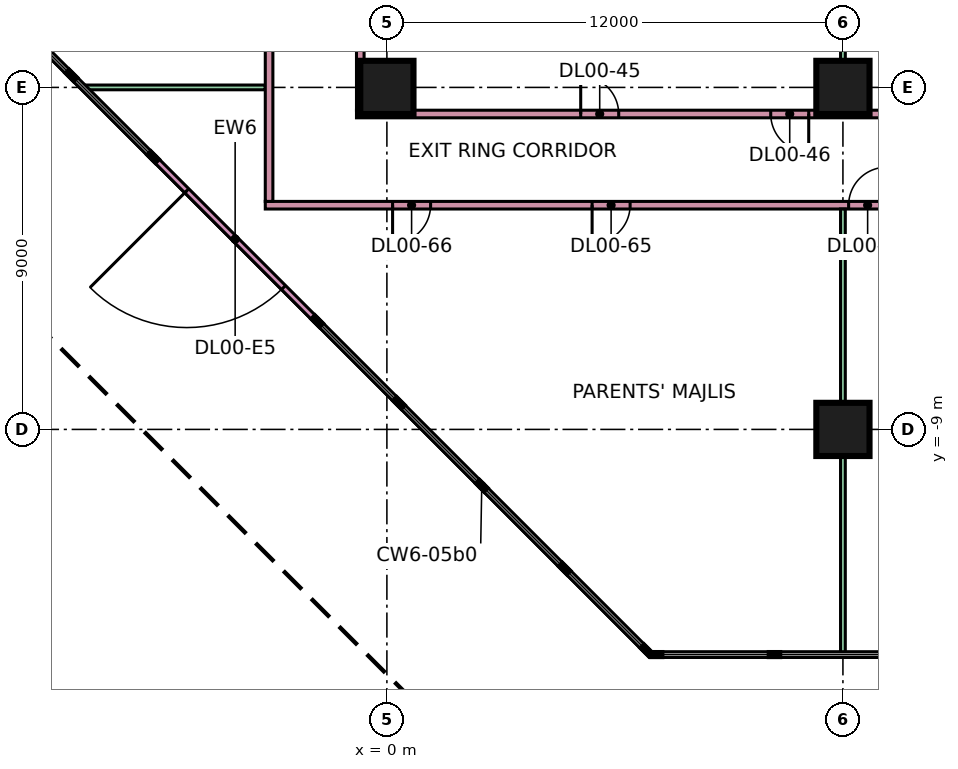
"""IFC4 building model, lengths in metres.
Left out: names, types, materials, properties, quantities, classifications, styles, units other than length and angle.
Written with IfcOpenShell. Run it as: python <this file> out.ifc"""

import sys

from ifc_helpers import new_model, si_unit, direction, frame, frame_2d, origin, origin_2d, place, context, subcontext, project, spatial, rectangle, extrude, element, fill, save


model = new_model("IFC4")
c1 = context("Model", 3, precision=1e-05, world=origin(), true_north=direction((0.0, 1.0)))
c2 = subcontext(c1, "Body", "Model", "MODEL_VIEW")
j1 = project(units=[si_unit("LENGTHUNIT", "METRE"), si_unit("PLANEANGLEUNIT", "RADIAN")], contexts=[c1])
p1 = place(None, origin())
s1 = spatial("IfcSite", under=j1, at=p1, CompositionType="ELEMENT")
p2 = place(p1, origin())
s2 = spatial("IfcBuilding", under=s1, at=p2, CompositionType="ELEMENT")
p3 = place(p2, origin())
s3 = spatial("IfcBuildingStorey", under=s2, at=p3, CompositionType="ELEMENT", Elevation=0.0)
for number, where, z_axis, x_axis in (
    (1, (12.0, -9.0, 0.0), (0.0, 0.0, 1.0), (1.0, 0.0, 0.0)),
    (2, (0.0, 0.0, 0.0), (0.0, 0.0, 1.0), (1.0, 0.0, 0.0)),
    (3, (12.0, 0.0, 0.0), (0.0, 0.0, 1.0), (1.0, 0.0, 0.0)),
):
    element("IfcColumn", number, at=place(p3, frame(where, z_axis=z_axis, x_axis=x_axis)), inside=s3, PredefinedType="COLUMN", context=c2, shape_type="SweptSolid", body=[
        extrude(rectangle(XDim=1.4, YDim=1.4, at=origin_2d()), origin(), (0.0, 0.0, 1.0), 7.2),
    ])
p4 = place(p3, frame((-6.114, -1.872, 0.0), z_axis=(0.0, 0.0, 1.0), x_axis=(0.707106781187, -0.707106781187, 0.0)))
e4 = element("IfcWall", 4, at=p4, inside=s3, PredefinedType="SOLIDWALL", context=c2, shape_type="SweptSolid", body=[
    extrude(rectangle(XDim=6.0, YDim=0.15, at=frame_2d((3.0, 0.0))), origin(), (0.0, 0.0, 1.0), 6.8),
])
p5 = place(p4, frame((1.2, 0.0, 0.0)))
e5 = element("IfcOpeningElement", 5, at=p5, cuts=e4, PredefinedType="OPENING", context=c2, shape_type="SweptSolid", body=[
    extrude(rectangle(XDim=3.6, YDim=2.8, at=frame_2d((1.8, 1.4))), frame((0.0, 0.085, 0.0), z_axis=(0.0, -1.0, 0.0), x_axis=(1.0, 0.0, 0.0)), (0.0, 0.0, 1.0), 0.17),
])
p6 = place(p3, frame((-7.986, 0.0, 0.0), z_axis=(0.0, 0.0, 1.0), x_axis=(1.0, 0.0, 0.0)))
e6 = element("IfcWall", 6, at=p6, inside=s3, PredefinedType="PARTITIONING", context=c2, shape_type="SweptSolid", body=[
    extrude(rectangle(XDim=4.786, YDim=0.125, at=frame_2d((2.393, 0.0))), origin(), (0.0, 0.0, 1.0), 6.8),
])
p7 = place(p3, frame((-3.2, -3.1, 0.0), z_axis=(0.0, 0.0, 1.0), x_axis=(1.0, 0.0, 0.0)))
e7 = element("IfcWall", 7, at=p7, inside=s3, PredefinedType="PARTITIONING", context=c2, shape_type="SweptSolid", body=[
    extrude(rectangle(XDim=78.3, YDim=0.2, at=frame_2d((39.15, 0.0))), origin(), (0.0, 0.0, 1.0), 6.8),
])
p8 = place(p7, frame((70.1, 0.0, 0.0)))
e8 = element("IfcOpeningElement", 8, at=p8, cuts=e7, PredefinedType="OPENING", context=c2, shape_type="SweptSolid", body=[
    extrude(rectangle(XDim=1.0, YDim=2.1, at=frame_2d((0.5, 1.05))), frame((0.0, 0.11, 0.0), z_axis=(0.0, -1.0, 0.0), x_axis=(1.0, 0.0, 0.0)), (0.0, 0.0, 1.0), 0.22),
])
p9 = place(p7, frame((66.35, 0.0, 0.0)))
e9 = element("IfcOpeningElement", 9, at=p9, cuts=e7, PredefinedType="OPENING", context=c2, shape_type="SweptSolid", body=[
    extrude(rectangle(XDim=1.0, YDim=2.1, at=frame_2d((0.5, 1.05))), frame((0.0, 0.11, 0.0), z_axis=(0.0, -1.0, 0.0), x_axis=(1.0, 0.0, 0.0)), (0.0, 0.0, 1.0), 0.22),
])
p10 = place(p7, frame((76.35, 0.0, 0.0)))
e10 = element("IfcOpeningElement", 10, at=p10, cuts=e7, PredefinedType="OPENING", context=c2, shape_type="SweptSolid", body=[
    extrude(rectangle(XDim=1.0, YDim=2.1, at=frame_2d((0.5, 1.05))), frame((0.0, 0.11, 0.0), z_axis=(0.0, -1.0, 0.0), x_axis=(1.0, 0.0, 0.0)), (0.0, 0.0, 1.0), 0.22),
])
p11 = place(p7, frame((8.6, 0.0, 0.0)))
e11 = element("IfcOpeningElement", 11, at=p11, cuts=e7, PredefinedType="OPENING", context=c2, shape_type="SweptSolid", body=[
    extrude(rectangle(XDim=1.0, YDim=2.1, at=frame_2d((0.5, 1.05))), frame((0.0, 0.11, 0.0), z_axis=(0.0, -1.0, 0.0), x_axis=(1.0, 0.0, 0.0)), (0.0, 0.0, 1.0), 0.22),
])
p12 = place(p7, frame((3.35, 0.0, 0.0)))
e12 = element("IfcOpeningElement", 12, at=p12, cuts=e7, PredefinedType="OPENING", context=c2, shape_type="SweptSolid", body=[
    extrude(rectangle(XDim=1.0, YDim=2.1, at=frame_2d((0.5, 1.05))), frame((0.0, 0.11, 0.0), z_axis=(0.0, -1.0, 0.0), x_axis=(1.0, 0.0, 0.0)), (0.0, 0.0, 1.0), 0.22),
])
p13 = place(p7, frame((20.6, 0.0, 0.0)))
e13 = element("IfcOpeningElement", 13, at=p13, cuts=e7, PredefinedType="OPENING", context=c2, shape_type="SweptSolid", body=[
    extrude(rectangle(XDim=1.0, YDim=2.1, at=frame_2d((0.5, 1.05))), frame((0.0, 0.11, 0.0), z_axis=(0.0, -1.0, 0.0), x_axis=(1.0, 0.0, 0.0)), (0.0, 0.0, 1.0), 0.22),
])
p14 = place(p7, frame((15.35, 0.0, 0.0)))
e14 = element("IfcOpeningElement", 14, at=p14, cuts=e7, PredefinedType="OPENING", context=c2, shape_type="SweptSolid", body=[
    extrude(rectangle(XDim=1.0, YDim=2.1, at=frame_2d((0.5, 1.05))), frame((0.0, 0.11, 0.0), z_axis=(0.0, -1.0, 0.0), x_axis=(1.0, 0.0, 0.0)), (0.0, 0.0, 1.0), 0.22),
])
p15 = place(p7, frame((32.6, 0.0, 0.0)))
e15 = element("IfcOpeningElement", 15, at=p15, cuts=e7, PredefinedType="OPENING", context=c2, shape_type="SweptSolid", body=[
    extrude(rectangle(XDim=1.0, YDim=2.1, at=frame_2d((0.5, 1.05))), frame((0.0, 0.11, 0.0), z_axis=(0.0, -1.0, 0.0), x_axis=(1.0, 0.0, 0.0)), (0.0, 0.0, 1.0), 0.22),
])
p16 = place(p7, frame((27.35, 0.0, 0.0)))
e16 = element("IfcOpeningElement", 16, at=p16, cuts=e7, PredefinedType="OPENING", context=c2, shape_type="SweptSolid", body=[
    extrude(rectangle(XDim=1.0, YDim=2.1, at=frame_2d((0.5, 1.05))), frame((0.0, 0.11, 0.0), z_axis=(0.0, -1.0, 0.0), x_axis=(1.0, 0.0, 0.0)), (0.0, 0.0, 1.0), 0.22),
])
p17 = place(p7, frame((44.85, 0.0, 0.0)))
e17 = element("IfcOpeningElement", 17, at=p17, cuts=e7, PredefinedType="OPENING", context=c2, shape_type="SweptSolid", body=[
    extrude(rectangle(XDim=1.8, YDim=2.1, at=frame_2d((0.9, 1.05))), frame((0.0, 0.11, 0.0), z_axis=(0.0, -1.0, 0.0), x_axis=(1.0, 0.0, 0.0)), (0.0, 0.0, 1.0), 0.22),
])
p18 = place(p7, frame((50.15, 0.0, 0.0)))
e18 = element("IfcOpeningElement", 18, at=p18, cuts=e7, PredefinedType="OPENING", context=c2, shape_type="SweptSolid", body=[
    extrude(rectangle(XDim=1.8, YDim=2.1, at=frame_2d((0.9, 1.05))), frame((0.0, 0.11, 0.0), z_axis=(0.0, -1.0, 0.0), x_axis=(1.0, 0.0, 0.0)), (0.0, 0.0, 1.0), 0.22),
])
p19 = place(p7, frame((53.75, 0.0, 0.0)))
e19 = element("IfcOpeningElement", 19, at=p19, cuts=e7, PredefinedType="OPENING", context=c2, shape_type="SweptSolid", body=[
    extrude(rectangle(XDim=1.8, YDim=2.1, at=frame_2d((0.9, 1.05))), frame((0.0, 0.11, 0.0), z_axis=(0.0, -1.0, 0.0), x_axis=(1.0, 0.0, 0.0)), (0.0, 0.0, 1.0), 0.22),
])
p20 = place(p3, frame((-3.1, -3.0, 0.0), z_axis=(0.0, 0.0, 1.0), x_axis=(0.0, 1.0, 0.0)))
e20 = element("IfcWall", 20, at=p20, inside=s3, PredefinedType="PARTITIONING", context=c2, shape_type="SweptSolid", body=[
    extrude(rectangle(XDim=69.1, YDim=0.2, at=frame_2d((34.55, 0.0))), origin(), (0.0, 0.0, 1.0), 6.8),
])
p21 = place(p20, frame((8.6, 0.0, 0.0)))
e21 = element("IfcOpeningElement", 21, at=p21, cuts=e20, PredefinedType="OPENING", context=c2, shape_type="SweptSolid", body=[
    extrude(rectangle(XDim=1.0, YDim=2.1, at=frame_2d((0.5, 1.05))), frame((0.0, 0.11, 0.0), z_axis=(0.0, -1.0, 0.0), x_axis=(1.0, 0.0, 0.0)), (0.0, 0.0, 1.0), 0.22),
])
p22 = place(p20, frame((13.85, 0.0, 0.0)))
e22 = element("IfcOpeningElement", 22, at=p22, cuts=e20, PredefinedType="OPENING", context=c2, shape_type="SweptSolid", body=[
    extrude(rectangle(XDim=1.0, YDim=2.1, at=frame_2d((0.5, 1.05))), frame((0.0, 0.11, 0.0), z_axis=(0.0, -1.0, 0.0), x_axis=(1.0, 0.0, 0.0)), (0.0, 0.0, 1.0), 0.22),
])
p23 = place(p20, frame((18.6, 0.0, 0.0)))
e23 = element("IfcOpeningElement", 23, at=p23, cuts=e20, PredefinedType="OPENING", context=c2, shape_type="SweptSolid", body=[
    extrude(rectangle(XDim=1.0, YDim=2.1, at=frame_2d((0.5, 1.05))), frame((0.0, 0.11, 0.0), z_axis=(0.0, -1.0, 0.0), x_axis=(1.0, 0.0, 0.0)), (0.0, 0.0, 1.0), 0.22),
])
p24 = place(p20, frame((66.95, 0.0, 0.0)))
e24 = element("IfcOpeningElement", 24, at=p24, cuts=e20, PredefinedType="OPENING", context=c2, shape_type="SweptSolid", body=[
    extrude(rectangle(XDim=1.0, YDim=2.1, at=frame_2d((0.5, 1.05))), frame((0.0, 0.11, 0.0), z_axis=(0.0, -1.0, 0.0), x_axis=(1.0, 0.0, 0.0)), (0.0, 0.0, 1.0), 0.22),
])
p25 = place(p20, frame((59.85, 0.0, 0.0)))
e25 = element("IfcOpeningElement", 25, at=p25, cuts=e20, PredefinedType="OPENING", context=c2, shape_type="SweptSolid", body=[
    extrude(rectangle(XDim=1.8, YDim=2.1, at=frame_2d((0.9, 1.05))), frame((0.0, 0.11, 0.0), z_axis=(0.0, -1.0, 0.0), x_axis=(1.0, 0.0, 0.0)), (0.0, 0.0, 1.0), 0.22),
])
p26 = place(p20, frame((49.85, 0.0, 0.0)))
e26 = element("IfcOpeningElement", 26, at=p26, cuts=e20, PredefinedType="OPENING", context=c2, shape_type="SweptSolid", body=[
    extrude(rectangle(XDim=1.8, YDim=2.1, at=frame_2d((0.9, 1.05))), frame((0.0, 0.11, 0.0), z_axis=(0.0, -1.0, 0.0), x_axis=(1.0, 0.0, 0.0)), (0.0, 0.0, 1.0), 0.22),
])
p27 = place(p20, frame((29.85, 0.0, 0.0)))
e27 = element("IfcOpeningElement", 27, at=p27, cuts=e20, PredefinedType="OPENING", context=c2, shape_type="SweptSolid", body=[
    extrude(rectangle(XDim=1.8, YDim=2.1, at=frame_2d((0.9, 1.05))), frame((0.0, 0.11, 0.0), z_axis=(0.0, -1.0, 0.0), x_axis=(1.0, 0.0, 0.0)), (0.0, 0.0, 1.0), 0.22),
])
p28 = place(p20, frame((39.6, 0.0, 0.0)))
e28 = element("IfcOpeningElement", 28, at=p28, cuts=e20, PredefinedType="OPENING", context=c2, shape_type="SweptSolid", body=[
    extrude(rectangle(XDim=1.8, YDim=2.1, at=frame_2d((0.9, 1.05))), frame((0.0, 0.11, 0.0), z_axis=(0.0, -1.0, 0.0), x_axis=(1.0, 0.0, 0.0)), (0.0, 0.0, 1.0), 0.22),
])
p29 = place(p20, frame((23.55, 0.0, 0.0)))
e29 = element("IfcOpeningElement", 29, at=p29, cuts=e20, PredefinedType="OPENING", context=c2, shape_type="SweptSolid", body=[
    extrude(rectangle(XDim=1.8, YDim=2.1, at=frame_2d((0.9, 1.05))), frame((0.0, 0.11, 0.0), z_axis=(0.0, -1.0, 0.0), x_axis=(1.0, 0.0, 0.0)), (0.0, 0.0, 1.0), 0.22),
])
p30 = place(p3, frame((-0.8, -0.7, 0.0), z_axis=(0.0, 0.0, 1.0), x_axis=(1.0, 0.0, 0.0)))
e30 = element("IfcWall", 30, at=p30, inside=s3, PredefinedType="PARTITIONING", context=c2, shape_type="SweptSolid", body=[
    extrude(rectangle(XDim=46.5, YDim=0.2, at=frame_2d((23.25, 0.0))), origin(), (0.0, 0.0, 1.0), 6.8),
])
p31 = place(p30, frame((39.85, 0.0, 0.0)))
e31 = element("IfcOpeningElement", 31, at=p31, cuts=e30, PredefinedType="OPENING", context=c2, shape_type="SweptSolid", body=[
    extrude(rectangle(XDim=1.8, YDim=2.1, at=frame_2d((0.9, 1.05))), frame((0.0, 0.11, 0.0), z_axis=(0.0, -1.0, 0.0), x_axis=(1.0, 0.0, 0.0)), (0.0, 0.0, 1.0), 0.22),
])
p32 = place(p30, frame((5.9, 0.0, 0.0)))
e32 = element("IfcOpeningElement", 32, at=p32, cuts=e30, PredefinedType="OPENING", context=c2, shape_type="SweptSolid", body=[
    extrude(rectangle(XDim=1.0, YDim=2.1, at=frame_2d((0.5, 1.05))), frame((0.0, 0.11, 0.0), z_axis=(0.0, -1.0, 0.0), x_axis=(1.0, 0.0, 0.0)), (0.0, 0.0, 1.0), 0.22),
])
p33 = place(p30, frame((10.9, 0.0, 0.0)))
e33 = element("IfcOpeningElement", 33, at=p33, cuts=e30, PredefinedType="OPENING", context=c2, shape_type="SweptSolid", body=[
    extrude(rectangle(XDim=1.0, YDim=2.1, at=frame_2d((0.5, 1.05))), frame((0.0, 0.11, 0.0), z_axis=(0.0, -1.0, 0.0), x_axis=(1.0, 0.0, 0.0)), (0.0, 0.0, 1.0), 0.22),
])
p34 = place(p30, frame((18.4, 0.0, 0.0)))
e34 = element("IfcOpeningElement", 34, at=p34, cuts=e30, PredefinedType="OPENING", context=c2, shape_type="SweptSolid", body=[
    extrude(rectangle(XDim=1.0, YDim=2.1, at=frame_2d((0.5, 1.05))), frame((0.0, 0.11, 0.0), z_axis=(0.0, -1.0, 0.0), x_axis=(1.0, 0.0, 0.0)), (0.0, 0.0, 1.0), 0.22),
])
p35 = place(p30, frame((29.4, 0.0, 0.0)))
e35 = element("IfcOpeningElement", 35, at=p35, cuts=e30, PredefinedType="OPENING", context=c2, shape_type="SweptSolid", body=[
    extrude(rectangle(XDim=1.0, YDim=2.1, at=frame_2d((0.5, 1.05))), frame((0.0, 0.11, 0.0), z_axis=(0.0, -1.0, 0.0), x_axis=(1.0, 0.0, 0.0)), (0.0, 0.0, 1.0), 0.22),
])
p36 = place(p3, frame((-0.7, -0.6, 0.0), z_axis=(0.0, 0.0, 1.0), x_axis=(0.0, 1.0, 0.0)))
e36 = element("IfcWall", 36, at=p36, inside=s3, PredefinedType="PARTITIONING", context=c2, shape_type="SweptSolid", body=[
    extrude(rectangle(XDim=23.6, YDim=0.2, at=frame_2d((11.8, 0.0))), origin(), (0.0, 0.0, 1.0), 6.8),
])
p37 = place(p36, frame((21.25, 0.0, 0.0)))
e37 = element("IfcOpeningElement", 37, at=p37, cuts=e36, PredefinedType="OPENING", context=c2, shape_type="SweptSolid", body=[
    extrude(rectangle(XDim=1.8, YDim=2.1, at=frame_2d((0.9, 1.05))), frame((0.0, 0.11, 0.0), z_axis=(0.0, -1.0, 0.0), x_axis=(1.0, 0.0, 0.0)), (0.0, 0.0, 1.0), 0.22),
])
p38 = place(p36, frame((13.5, 0.0, 0.0)))
e38 = element("IfcOpeningElement", 38, at=p38, cuts=e36, PredefinedType="OPENING", context=c2, shape_type="SweptSolid", body=[
    extrude(rectangle(XDim=1.0, YDim=2.1, at=frame_2d((0.5, 1.05))), frame((0.0, 0.11, 0.0), z_axis=(0.0, -1.0, 0.0), x_axis=(1.0, 0.0, 0.0)), (0.0, 0.0, 1.0), 0.22),
])
p39 = place(p3, frame((12.0, -14.925, 0.0), z_axis=(0.0, 0.0, 1.0), x_axis=(0.0, 1.0, 0.0)))
e39 = element("IfcWall", 39, at=p39, inside=s3, PredefinedType="PARTITIONING", context=c2, shape_type="SweptSolid", body=[
    extrude(rectangle(XDim=11.725, YDim=0.125, at=frame_2d((5.863, 0.0))), origin(), (0.0, 0.0, 1.0), 6.8),
])
p40 = place(p3, frame((12.0, -0.6, 0.0), z_axis=(0.0, 0.0, 1.0), x_axis=(0.0, 1.0, 0.0)))
e40 = element("IfcWall", 40, at=p40, inside=s3, PredefinedType="PARTITIONING", context=c2, shape_type="SweptSolid", body=[
    extrude(rectangle(XDim=7.6, YDim=0.125, at=frame_2d((3.8, 0.0))), origin(), (0.0, 0.0, 1.0), 6.8),
])
p41 = place(p5, frame((3.6, 0.0, 0.0), z_axis=(0.0, 0.0, 1.0), x_axis=(-1.0, 0.0, 0.0)))
e41 = element("IfcDoor", 41, at=p41, inside=s3, OperationType="DOUBLE_DOOR_SINGLE_SWING", PredefinedType="DOOR", context=c2, shape_type="SweptSolid", body=[
    extrude(rectangle(XDim=3.6, YDim=2.8, at=frame_2d((1.8, 1.4))), frame((0.0, 0.025, 0.0), z_axis=(0.0, -1.0, 0.0), x_axis=(1.0, 0.0, 0.0)), (0.0, 0.0, 1.0), 0.05),
])
fill(e5, e41)
p42 = place(p32, origin())
e42 = element("IfcDoor", 42, at=p42, inside=s3, OperationType="SINGLE_SWING_LEFT", PredefinedType="DOOR", context=c2, shape_type="SweptSolid", body=[
    extrude(rectangle(XDim=1.0, YDim=2.1, at=frame_2d((0.5, 1.05))), frame((0.0, 0.025, 0.0), z_axis=(0.0, -1.0, 0.0), x_axis=(1.0, 0.0, 0.0)), (0.0, 0.0, 1.0), 0.05),
])
fill(e32, e42)
p43 = place(p33, origin())
e43 = element("IfcDoor", 43, at=p43, inside=s3, OperationType="SINGLE_SWING_RIGHT", PredefinedType="DOOR", context=c2, shape_type="SweptSolid", body=[
    extrude(rectangle(XDim=1.0, YDim=2.1, at=frame_2d((0.5, 1.05))), frame((0.0, 0.025, 0.0), z_axis=(0.0, -1.0, 0.0), x_axis=(1.0, 0.0, 0.0)), (0.0, 0.0, 1.0), 0.05),
])
fill(e33, e43)
p44 = place(p11, frame((1.0, 0.0, 0.0), z_axis=(0.0, 0.0, 1.0), x_axis=(-1.0, 0.0, 0.0)))
e44 = element("IfcDoor", 44, at=p44, inside=s3, OperationType="SINGLE_SWING_LEFT", PredefinedType="DOOR", context=c2, shape_type="SweptSolid", body=[
    extrude(rectangle(XDim=1.0, YDim=2.1, at=frame_2d((0.5, 1.05))), frame((0.0, 0.025, 0.0), z_axis=(0.0, -1.0, 0.0), x_axis=(1.0, 0.0, 0.0)), (0.0, 0.0, 1.0), 0.05),
])
fill(e11, e44)
p45 = place(p12, frame((1.0, 0.0, 0.0), z_axis=(0.0, 0.0, 1.0), x_axis=(-1.0, 0.0, 0.0)))
e45 = element("IfcDoor", 45, at=p45, inside=s3, OperationType="SINGLE_SWING_LEFT", PredefinedType="DOOR", context=c2, shape_type="SweptSolid", body=[
    extrude(rectangle(XDim=1.0, YDim=2.1, at=frame_2d((0.5, 1.05))), frame((0.0, 0.025, 0.0), z_axis=(0.0, -1.0, 0.0), x_axis=(1.0, 0.0, 0.0)), (0.0, 0.0, 1.0), 0.05),
])
fill(e12, e45)
p46 = place(p14, frame((1.0, 0.0, 0.0), z_axis=(0.0, 0.0, 1.0), x_axis=(-1.0, 0.0, 0.0)))
e46 = element("IfcDoor", 46, at=p46, inside=s3, OperationType="SINGLE_SWING_RIGHT", PredefinedType="DOOR", context=c2, shape_type="SweptSolid", body=[
    extrude(rectangle(XDim=1.0, YDim=2.1, at=frame_2d((0.5, 1.05))), frame((0.0, 0.025, 0.0), z_axis=(0.0, -1.0, 0.0), x_axis=(1.0, 0.0, 0.0)), (0.0, 0.0, 1.0), 0.05),
])
fill(e14, e46)
save(model, sys.argv[1])
